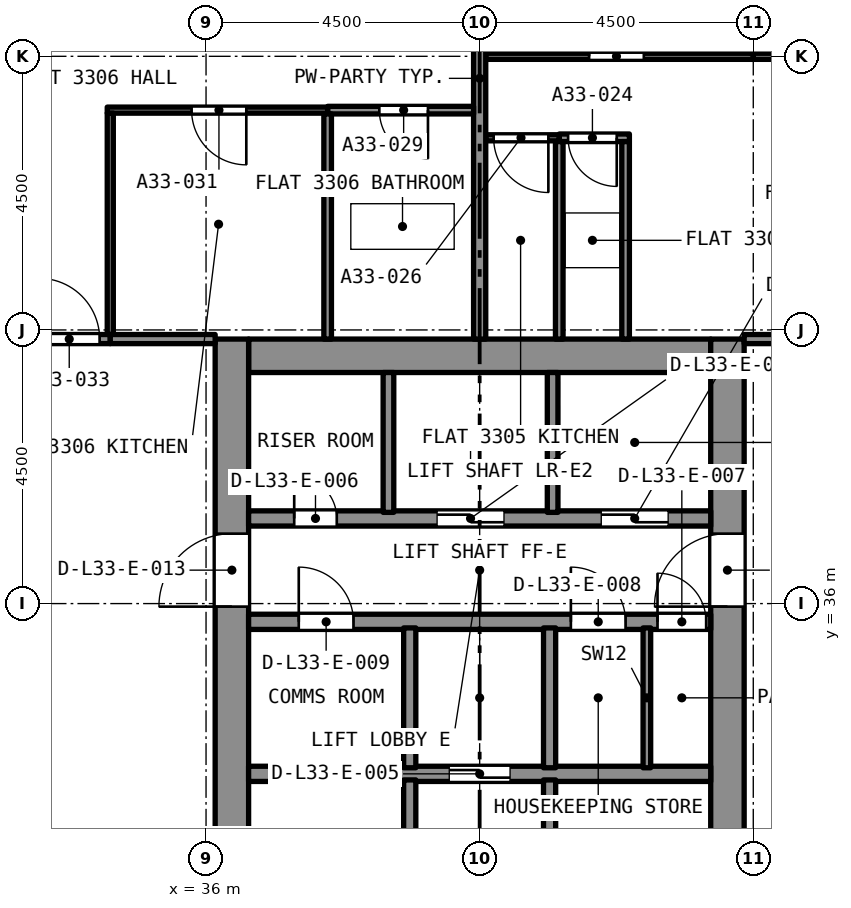
"""IFC4 building model, lengths in metres.
Left out: names, types, materials, properties, quantities, classifications, styles, units other than length and angle.
Written with IfcOpenShell. Run it as: python <this file> out.ifc"""

import sys

from ifc_helpers import new_model, si_unit, direction, frame, frame_2d, origin, place, context, subcontext, project, spatial, rectangle, extrude, element, fill, save


model = new_model("IFC4")
c1 = context("Model", 3, precision=1e-05, world=origin(), true_north=direction((0.0, 1.0)))
c2 = subcontext(c1, "Body", "Model", "MODEL_VIEW")
j1 = project(units=[si_unit("LENGTHUNIT", "METRE"), si_unit("PLANEANGLEUNIT", "RADIAN")], contexts=[c1])
p1 = place(None, origin())
s1 = spatial("IfcSite", under=j1, at=p1, CompositionType="ELEMENT")
p2 = place(p1, origin())
s2 = spatial("IfcBuilding", under=s1, at=p2, CompositionType="ELEMENT")
p3 = place(p2, frame((0.0, 0.0, 118.4)))
s3 = spatial("IfcBuildingStorey", under=s2, at=p3, CompositionType="ELEMENT", Elevation=118.4)
p4 = place(p3, frame((36.7, 40.075, 0.0), z_axis=(0.0, 0.0, 1.0), x_axis=(1.0, 0.0, 0.0)))
e1 = element("IfcWall", 1, at=p4, inside=s3, PredefinedType="SOLIDWALL", context=c2, shape_type="SweptSolid", body=[
    extrude(rectangle(XDim=7.6, YDim=0.55, at=frame_2d((3.8, 0.0))), origin(), (0.0, 0.0, 1.0), 3.2),
])
p5 = place(p3, frame((36.425, 27.15, 0.0), z_axis=(0.0, 0.0, 1.0), x_axis=(0.0, 1.0, 0.0)))
e2 = element("IfcWall", 2, at=p5, inside=s3, PredefinedType="SOLIDWALL", context=c2, shape_type="SweptSolid", body=[
    extrude(rectangle(XDim=13.2, YDim=0.55, at=frame_2d((6.6, 0.0))), origin(), (0.0, 0.0, 1.0), 3.2),
])
p6 = place(p5, frame((8.8, 0.0, 0.0)))
e3 = element("IfcOpeningElement", 3, at=p6, cuts=e2, PredefinedType="OPENING", context=c2, shape_type="SweptSolid", body=[
    extrude(rectangle(XDim=1.2, YDim=2.1, at=frame_2d((0.6, 1.05))), frame((0.0, 0.285, 0.0), z_axis=(0.0, -1.0, 0.0), x_axis=(1.0, 0.0, 0.0)), (0.0, 0.0, 1.0), 0.57),
])
p7 = place(p3, frame((44.575, 27.15, 0.0), z_axis=(0.0, 0.0, 1.0), x_axis=(0.0, 1.0, 0.0)))
e4 = element("IfcWall", 4, at=p7, inside=s3, PredefinedType="SOLIDWALL", context=c2, shape_type="SweptSolid", body=[
    extrude(rectangle(XDim=13.2, YDim=0.55, at=frame_2d((6.6, 0.0))), origin(), (0.0, 0.0, 1.0), 3.2),
])
p8 = place(p7, frame((8.8, 0.0, 0.0)))
e5 = element("IfcOpeningElement", 5, at=p8, cuts=e4, PredefinedType="OPENING", context=c2, shape_type="SweptSolid", body=[
    extrude(rectangle(XDim=1.2, YDim=2.1, at=frame_2d((0.6, 1.05))), frame((0.0, 0.285, 0.0), z_axis=(0.0, -1.0, 0.0), x_axis=(1.0, 0.0, 0.0)), (0.0, 0.0, 1.0), 0.57),
])
p9 = place(p3, frame((42.962, 43.66, 0.0), z_axis=(0.0, 0.0, 1.0), x_axis=(-1.0, 0.0, 0.0)))
e6 = element("IfcWall", 6, at=p9, inside=s3, PredefinedType="PARTITIONING", context=c2, shape_type="SweptSolid", body=[
    extrude(rectangle(XDim=1.153, YDim=0.125, at=frame_2d((0.577, 0.0))), origin(), (0.0, 0.0, 1.0), 2.9),
])
p10 = place(p9, frame((0.208, 0.0, 0.0)))
e7 = element("IfcOpeningElement", 7, at=p10, cuts=e6, PredefinedType="OPENING", context=c2, shape_type="SweptSolid", body=[
    extrude(rectangle(XDim=0.8, YDim=2.1, at=frame_2d((0.4, 1.05))), frame((0.0, 0.073, 0.0), z_axis=(0.0, -1.0, 0.0), x_axis=(1.0, 0.0, 0.0)), (0.0, 0.0, 1.0), 0.145),
])
for number, where, z_axis, x_axis in (
    (8, (42.9, 40.35, 0.0), (0.0, 0.0, 1.0), (0.0, 1.0, 0.0)),
    (9, (41.809, 40.35, 0.0), (0.0, 0.0, 1.0), (0.0, 1.0, 0.0)),
):
    element("IfcWall", number, at=place(p3, frame(where, z_axis=z_axis, x_axis=x_axis)), inside=s3, PredefinedType="PARTITIONING", context=c2, shape_type="SweptSolid", body=[
        extrude(rectangle(XDim=3.247, YDim=0.125, at=frame_2d((1.624, 0.0))), origin(), (0.0, 0.0, 1.0), 2.9),
    ])
p11 = place(p3, frame((40.6, 45.0, 0.0), z_axis=(0.0, 0.0, 1.0), x_axis=(1.0, 0.0, 0.0)))
e10 = element("IfcWall", 10, at=p11, inside=s3, PredefinedType="PARTITIONING", context=c2, shape_type="SweptSolid", body=[
    extrude(rectangle(XDim=4.4, YDim=0.1, at=frame_2d((2.2, 0.0))), origin(), (0.0, 0.0, 1.0), 2.9),
])
p12 = place(p11, frame((1.7, 0.0, 0.0)))
e11 = element("IfcOpeningElement", 11, at=p12, cuts=e10, PredefinedType="OPENING", context=c2, shape_type="SweptSolid", body=[
    extrude(rectangle(XDim=0.9, YDim=2.1, at=frame_2d((0.45, 1.05))), frame((0.0, 0.06, 0.0), z_axis=(0.0, -1.0, 0.0), x_axis=(1.0, 0.0, 0.0)), (0.0, 0.0, 1.0), 0.12),
])
p13 = place(p3, frame((45.0, 45.05, 0.0), z_axis=(0.0, 0.0, 1.0), x_axis=(0.0, 1.0, 0.0)))
e12 = element("IfcWall", 12, at=p13, inside=s3, PredefinedType="PARTITIONING", context=c2, shape_type="SweptSolid", body=[
    extrude(rectangle(XDim=3.828, YDim=0.1, at=frame_2d((1.914, 0.0))), origin(), (0.0, 0.0, 1.0), 2.9),
])
p14 = place(p3, frame((41.809, 43.66, 0.0), z_axis=(0.0, 0.0, 1.0), x_axis=(-1.0, 0.0, 0.0)))
e13 = element("IfcWall", 13, at=p14, inside=s3, PredefinedType="PARTITIONING", context=c2, shape_type="SweptSolid", body=[
    extrude(rectangle(XDim=1.209, YDim=0.1, at=frame_2d((0.604, 0.0))), origin(), (0.0, 0.0, 1.0), 2.9),
])
p15 = place(p14, frame((0.179, 0.0, 0.0)))
e14 = element("IfcOpeningElement", 14, at=p15, cuts=e13, PredefinedType="OPENING", context=c2, shape_type="SweptSolid", body=[
    extrude(rectangle(XDim=0.9, YDim=2.1, at=frame_2d((0.45, 1.05))), frame((0.0, 0.06, 0.0), z_axis=(0.0, -1.0, 0.0), x_axis=(1.0, 0.0, 0.0)), (0.0, 0.0, 1.0), 0.12),
])
p16 = place(p3, frame((45.0, 45.0, 0.0), z_axis=(0.0, 0.0, 1.0), x_axis=(1.0, 0.0, 0.0)))
e15 = element("IfcWall", 15, at=p16, inside=s3, PredefinedType="PARTITIONING", context=c2, shape_type="SweptSolid", body=[
    extrude(rectangle(XDim=3.878, YDim=0.1, at=frame_2d((1.939, 0.0))), origin(), (0.0, 0.0, 1.0), 2.9),
])
p17 = place(p16, frame((1.462, 0.0, 0.0)))
e16 = element("IfcOpeningElement", 16, at=p17, cuts=e15, PredefinedType="OPENING", context=c2, shape_type="SweptSolid", body=[
    extrude(rectangle(XDim=1.0, YDim=2.1, at=frame_2d((0.5, 1.05))), frame((0.0, 0.06, 0.0), z_axis=(0.0, -1.0, 0.0), x_axis=(1.0, 0.0, 0.0)), (0.0, 0.0, 1.0), 0.12),
])
p18 = place(p3, frame((44.85, 40.35, 0.0), z_axis=(0.0, 0.0, 1.0), x_axis=(1.0, 0.0, 0.0)))
e17 = element("IfcWall", 17, at=p18, inside=s3, PredefinedType="PARTITIONING", context=c2, shape_type="SweptSolid", body=[
    extrude(rectangle(XDim=4.075, YDim=0.15, at=frame_2d((2.038, 0.0))), origin(), (0.0, 0.0, 1.0), 2.9),
])
p19 = place(p18, frame((1.9, 0.0, 0.0)))
e18 = element("IfcOpeningElement", 18, at=p19, cuts=e17, PredefinedType="OPENING", context=c2, shape_type="SweptSolid", body=[
    extrude(rectangle(XDim=1.0, YDim=2.1, at=frame_2d((0.5, 1.05))), frame((0.0, 0.085, 0.0), z_axis=(0.0, -1.0, 0.0), x_axis=(1.0, 0.0, 0.0)), (0.0, 0.0, 1.0), 0.17),
])
p20 = place(p3, frame((40.5, 40.35, 0.0), z_axis=(0.0, 0.0, 1.0), x_axis=(0.0, 1.0, 0.0)))
e19 = element("IfcWall", 19, at=p20, inside=s3, PredefinedType="PARTITIONING", context=c2, shape_type="SweptSolid", body=[
    extrude(rectangle(XDim=8.575, YDim=0.2, at=frame_2d((4.288, 0.0))), origin(), (0.0, 0.0, 1.0), 2.9),
])
p21 = place(p3, frame((40.4, 44.115, 0.0), z_axis=(0.0, 0.0, 1.0), x_axis=(-1.0, 0.0, 0.0)))
e20 = element("IfcWall", 20, at=p21, inside=s3, PredefinedType="PARTITIONING", context=c2, shape_type="SweptSolid", body=[
    extrude(rectangle(XDim=2.4, YDim=0.125, at=frame_2d((1.2, 0.0))), origin(), (0.0, 0.0, 1.0), 2.9),
])
p22 = place(p21, frame((0.75, 0.0, 0.0)))
e21 = element("IfcOpeningElement", 21, at=p22, cuts=e20, PredefinedType="OPENING", context=c2, shape_type="SweptSolid", body=[
    extrude(rectangle(XDim=0.8, YDim=2.1, at=frame_2d((0.4, 1.05))), frame((0.0, 0.073, 0.0), z_axis=(0.0, -1.0, 0.0), x_axis=(1.0, 0.0, 0.0)), (0.0, 0.0, 1.0), 0.145),
])
p23 = place(p3, frame((38.0, 40.35, 0.0), z_axis=(0.0, 0.0, 1.0), x_axis=(0.0, 1.0, 0.0)))
e22 = element("IfcWall", 22, at=p23, inside=s3, PredefinedType="PARTITIONING", context=c2, shape_type="SweptSolid", body=[
    extrude(rectangle(XDim=3.702, YDim=0.125, at=frame_2d((1.851, 0.0))), origin(), (0.0, 0.0, 1.0), 2.9),
])
p24 = place(p3, frame((38.0, 44.115, 0.0), z_axis=(0.0, 0.0, 1.0), x_axis=(-1.0, 0.0, 0.0)))
e23 = element("IfcWall", 23, at=p24, inside=s3, PredefinedType="PARTITIONING", context=c2, shape_type="SweptSolid", body=[
    extrude(rectangle(XDim=3.625, YDim=0.1, at=frame_2d((1.812, 0.0))), origin(), (0.0, 0.0, 1.0), 2.9),
])
p25 = place(p24, frame((1.337, 0.0, 0.0)))
e24 = element("IfcOpeningElement", 24, at=p25, cuts=e23, PredefinedType="OPENING", context=c2, shape_type="SweptSolid", body=[
    extrude(rectangle(XDim=0.9, YDim=2.1, at=frame_2d((0.45, 1.05))), frame((0.0, 0.06, 0.0), z_axis=(0.0, -1.0, 0.0), x_axis=(1.0, 0.0, 0.0)), (0.0, 0.0, 1.0), 0.12),
])
p26 = place(p3, frame((34.425, 40.425, 0.0), z_axis=(0.0, 0.0, 1.0), x_axis=(0.0, 1.0, 0.0)))
e25 = element("IfcWall", 25, at=p26, inside=s3, PredefinedType="PARTITIONING", context=c2, shape_type="SweptSolid", body=[
    extrude(rectangle(XDim=3.64, YDim=0.1, at=frame_2d((1.82, 0.0))), origin(), (0.0, 0.0, 1.0), 2.9),
])
p27 = place(p3, frame((32.075, 40.35, 0.0), z_axis=(0.0, 0.0, 1.0), x_axis=(1.0, 0.0, 0.0)))
e26 = element("IfcWall", 26, at=p27, inside=s3, PredefinedType="PARTITIONING", context=c2, shape_type="SweptSolid", body=[
    extrude(rectangle(XDim=2.35, YDim=0.15, at=frame_2d((1.175, 0.0))), origin(), (0.0, 0.0, 1.0), 2.9),
])
p28 = place(p27, frame((1.175, 0.0, 0.0)))
e27 = element("IfcOpeningElement", 27, at=p28, cuts=e26, PredefinedType="OPENING", context=c2, shape_type="SweptSolid", body=[
    extrude(rectangle(XDim=1.0, YDim=2.1, at=frame_2d((0.5, 1.05))), frame((0.0, 0.085, 0.0), z_axis=(0.0, -1.0, 0.0), x_axis=(1.0, 0.0, 0.0)), (0.0, 0.0, 1.0), 0.17),
])
p29 = place(p3, frame((34.425, 40.35, 0.0), z_axis=(0.0, 0.0, 1.0), x_axis=(1.0, 0.0, 0.0)))
e28 = element("IfcWall", 28, at=p29, inside=s3, PredefinedType="PARTITIONING", context=c2, shape_type="SweptSolid", body=[
    extrude(rectangle(XDim=1.725, YDim=0.15, at=frame_2d((0.862, 0.0))), origin(), (0.0, 0.0, 1.0), 2.9),
])
p30 = place(p3, frame((36.7, 33.2, 0.0), z_axis=(0.0, 0.0, 1.0), x_axis=(1.0, 0.0, 0.0)))
e29 = element("IfcWall", 29, at=p30, inside=s3, PredefinedType="SOLIDWALL", context=c2, shape_type="SweptSolid", body=[
    extrude(rectangle(XDim=7.6, YDim=0.25, at=frame_2d((3.8, 0.0))), origin(), (0.0, 0.0, 1.0), 2.9),
])
p31 = place(p30, frame((3.3, 0.0, 0.0)))
e30 = element("IfcOpeningElement", 30, at=p31, cuts=e29, PredefinedType="OPENING", context=c2, shape_type="SweptSolid", body=[
    extrude(rectangle(XDim=1.0, YDim=2.1, at=frame_2d((0.5, 1.05))), frame((0.0, 0.135, 0.0), z_axis=(0.0, -1.0, 0.0), x_axis=(1.0, 0.0, 0.0)), (0.0, 0.0, 1.0), 0.27),
])
p32 = place(p3, frame((36.7, 35.7, 0.0), z_axis=(0.0, 0.0, 1.0), x_axis=(1.0, 0.0, 0.0)))
e31 = element("IfcWall", 31, at=p32, inside=s3, PredefinedType="SOLIDWALL", context=c2, shape_type="SweptSolid", body=[
    extrude(rectangle(XDim=7.6, YDim=0.25, at=frame_2d((3.8, 0.0))), origin(), (0.0, 0.0, 1.0), 2.9),
])
p33 = place(p32, frame((6.725, 0.0, 0.0)))
e32 = element("IfcOpeningElement", 32, at=p33, cuts=e31, PredefinedType="OPENING", context=c2, shape_type="SweptSolid", body=[
    extrude(rectangle(XDim=0.8, YDim=2.1, at=frame_2d((0.4, 1.05))), frame((0.0, 0.135, 0.0), z_axis=(0.0, -1.0, 0.0), x_axis=(1.0, 0.0, 0.0)), (0.0, 0.0, 1.0), 0.27),
])
p34 = place(p32, frame((5.3, 0.0, 0.0)))
e33 = element("IfcOpeningElement", 33, at=p34, cuts=e31, PredefinedType="OPENING", context=c2, shape_type="SweptSolid", body=[
    extrude(rectangle(XDim=0.9, YDim=2.1, at=frame_2d((0.45, 1.05))), frame((0.0, 0.135, 0.0), z_axis=(0.0, -1.0, 0.0), x_axis=(1.0, 0.0, 0.0)), (0.0, 0.0, 1.0), 0.27),
])
p35 = place(p32, frame((0.825, 0.0, 0.0)))
e34 = element("IfcOpeningElement", 34, at=p35, cuts=e31, PredefinedType="OPENING", context=c2, shape_type="SweptSolid", body=[
    extrude(rectangle(XDim=0.9, YDim=2.1, at=frame_2d((0.45, 1.05))), frame((0.0, 0.135, 0.0), z_axis=(0.0, -1.0, 0.0), x_axis=(1.0, 0.0, 0.0)), (0.0, 0.0, 1.0), 0.27),
])
p36 = place(p3, frame((36.7, 37.4, 0.0), z_axis=(0.0, 0.0, 1.0), x_axis=(1.0, 0.0, 0.0)))
e35 = element("IfcWall", 35, at=p36, inside=s3, PredefinedType="SOLIDWALL", context=c2, shape_type="SweptSolid", body=[
    extrude(rectangle(XDim=7.6, YDim=0.25, at=frame_2d((3.8, 0.0))), origin(), (0.0, 0.0, 1.0), 2.9),
])
p37 = place(p36, frame((5.8, 0.0, 0.0)))
e36 = element("IfcOpeningElement", 36, at=p37, cuts=e35, PredefinedType="OPENING", context=c2, shape_type="SweptSolid", body=[
    extrude(rectangle(XDim=1.1, YDim=2.4, at=frame_2d((0.55, 1.2))), frame((0.0, 0.135, 0.0), z_axis=(0.0, -1.0, 0.0), x_axis=(1.0, 0.0, 0.0)), (0.0, 0.0, 1.0), 0.27),
])
p38 = place(p36, frame((3.1, 0.0, 0.0)))
e37 = element("IfcOpeningElement", 37, at=p38, cuts=e35, PredefinedType="OPENING", context=c2, shape_type="SweptSolid", body=[
    extrude(rectangle(XDim=1.1, YDim=2.4, at=frame_2d((0.55, 1.2))), frame((0.0, 0.135, 0.0), z_axis=(0.0, -1.0, 0.0), x_axis=(1.0, 0.0, 0.0)), (0.0, 0.0, 1.0), 0.27),
])
p39 = place(p36, frame((0.75, 0.0, 0.0)))
e38 = element("IfcOpeningElement", 38, at=p39, cuts=e35, PredefinedType="OPENING", context=c2, shape_type="SweptSolid", body=[
    extrude(rectangle(XDim=0.7, YDim=2.1, at=frame_2d((0.35, 1.05))), frame((0.0, 0.135, 0.0), z_axis=(0.0, -1.0, 0.0), x_axis=(1.0, 0.0, 0.0)), (0.0, 0.0, 1.0), 0.27),
])
p40 = place(p3, frame((41.65, 27.7, 0.0), z_axis=(0.0, 0.0, 1.0), x_axis=(0.0, 1.0, 0.0)))
e39 = element("IfcWall", 39, at=p40, inside=s3, PredefinedType="SOLIDWALL", context=c2, shape_type="SweptSolid", body=[
    extrude(rectangle(XDim=5.4, YDim=0.2, at=frame_2d((2.7, 0.0))), origin(), (0.0, 0.0, 1.0), 2.9),
])
p41 = place(p40, frame((0.2, 0.0, 0.0)))
e40 = element("IfcOpeningElement", 40, at=p41, cuts=e39, PredefinedType="OPENING", context=c2, shape_type="SweptSolid", body=[
    extrude(rectangle(XDim=0.9, YDim=2.1, at=frame_2d((0.45, 1.05))), frame((0.0, 0.11, 0.0), z_axis=(0.0, -1.0, 0.0), x_axis=(1.0, 0.0, 0.0)), (0.0, 0.0, 1.0), 0.22),
])
p42 = place(p3, frame((39.35, 27.7, 0.0), z_axis=(0.0, 0.0, 1.0), x_axis=(0.0, 1.0, 0.0)))
e41 = element("IfcWall", 41, at=p42, inside=s3, PredefinedType="SOLIDWALL", context=c2, shape_type="SweptSolid", body=[
    extrude(rectangle(XDim=5.4, YDim=0.2, at=frame_2d((2.7, 0.0))), origin(), (0.0, 0.0, 1.0), 2.9),
])
p43 = place(p42, frame((0.2, 0.0, 0.0)))
e42 = element("IfcOpeningElement", 42, at=p43, cuts=e41, PredefinedType="OPENING", context=c2, shape_type="SweptSolid", body=[
    extrude(rectangle(XDim=0.9, YDim=2.1, at=frame_2d((0.45, 1.05))), frame((0.0, 0.11, 0.0), z_axis=(0.0, -1.0, 0.0), x_axis=(1.0, 0.0, 0.0)), (0.0, 0.0, 1.0), 0.22),
])
for number, where, z_axis, x_axis in (
    (43, (41.65, 33.3, 0.0), (0.0, 0.0, 1.0), (0.0, 1.0, 0.0)),
    (44, (39.35, 33.3, 0.0), (0.0, 0.0, 1.0), (0.0, 1.0, 0.0)),
):
    element("IfcWall", number, at=place(p3, frame(where, z_axis=z_axis, x_axis=x_axis)), inside=s3, PredefinedType="SOLIDWALL", context=c2, shape_type="SweptSolid", body=[
        extrude(rectangle(XDim=2.3, YDim=0.2, at=frame_2d((1.15, 0.0))), origin(), (0.0, 0.0, 1.0), 2.9),
    ])
for number, where, z_axis, x_axis in (
    (45, (41.7, 37.5, 0.0), (0.0, 0.0, 1.0), (0.0, 1.0, 0.0)),
    (46, (39.0, 37.5, 0.0), (0.0, 0.0, 1.0), (0.0, 1.0, 0.0)),
):
    element("IfcWall", number, at=place(p3, frame(where, z_axis=z_axis, x_axis=x_axis)), inside=s3, PredefinedType="SOLIDWALL", context=c2, shape_type="SweptSolid", body=[
        extrude(rectangle(XDim=2.3, YDim=0.175, at=frame_2d((1.15, 0.0))), origin(), (0.0, 0.0, 1.0), 2.9),
    ])
p44 = place(p3, frame((43.25, 33.3, 0.0), z_axis=(0.0, 0.0, 1.0), x_axis=(0.0, 1.0, 0.0)))
e47 = element("IfcWall", 47, at=p44, inside=s3, PredefinedType="PARTITIONING", context=c2, shape_type="SweptSolid", body=[
    extrude(rectangle(XDim=2.3, YDim=0.125, at=frame_2d((1.15, 0.0))), origin(), (0.0, 0.0, 1.0), 2.9),
])
p45 = place(p10, origin())
e48 = element("IfcDoor", 48, at=p45, inside=s3, OperationType="SINGLE_SWING_RIGHT", PredefinedType="DOOR", context=c2, shape_type="SweptSolid", body=[
    extrude(rectangle(XDim=0.8, YDim=2.1, at=frame_2d((0.4, 1.05))), frame((0.0, 0.025, 0.0), z_axis=(0.0, -1.0, 0.0), x_axis=(1.0, 0.0, 0.0)), (0.0, 0.0, 1.0), 0.05),
])
fill(e7, e48)
p46 = place(p12, origin())
e49 = element("IfcDoor", 49, at=p46, inside=s3, OperationType="SINGLE_SWING_LEFT", PredefinedType="DOOR", context=c2, shape_type="SweptSolid", body=[
    extrude(rectangle(XDim=0.9, YDim=2.1, at=frame_2d((0.45, 1.05))), frame((0.0, 0.025, 0.0), z_axis=(0.0, -1.0, 0.0), x_axis=(1.0, 0.0, 0.0)), (0.0, 0.0, 1.0), 0.05),
])
fill(e11, e49)
p47 = place(p15, origin())
e50 = element("IfcDoor", 50, at=p47, inside=s3, OperationType="SINGLE_SWING_RIGHT", PredefinedType="DOOR", context=c2, shape_type="SweptSolid", body=[
    extrude(rectangle(XDim=0.9, YDim=2.1, at=frame_2d((0.45, 1.05))), frame((0.0, 0.025, 0.0), z_axis=(0.0, -1.0, 0.0), x_axis=(1.0, 0.0, 0.0)), (0.0, 0.0, 1.0), 0.05),
])
fill(e14, e50)
p48 = place(p22, origin())
e51 = element("IfcDoor", 51, at=p48, inside=s3, OperationType="SINGLE_SWING_LEFT", PredefinedType="DOOR", context=c2, shape_type="SweptSolid", body=[
    extrude(rectangle(XDim=0.8, YDim=2.1, at=frame_2d((0.4, 1.05))), frame((0.0, 0.025, 0.0), z_axis=(0.0, -1.0, 0.0), x_axis=(1.0, 0.0, 0.0)), (0.0, 0.0, 1.0), 0.05),
])
fill(e21, e51)
p49 = place(p25, origin())
e52 = element("IfcDoor", 52, at=p49, inside=s3, OperationType="SINGLE_SWING_LEFT", PredefinedType="DOOR", context=c2, shape_type="SweptSolid", body=[
    extrude(rectangle(XDim=0.9, YDim=2.1, at=frame_2d((0.45, 1.05))), frame((0.0, 0.025, 0.0), z_axis=(0.0, -1.0, 0.0), x_axis=(1.0, 0.0, 0.0)), (0.0, 0.0, 1.0), 0.05),
])
fill(e24, e52)
p50 = place(p28, origin())
e53 = element("IfcDoor", 53, at=p50, inside=s3, OperationType="SINGLE_SWING_RIGHT", PredefinedType="DOOR", context=c2, shape_type="SweptSolid", body=[
    extrude(rectangle(XDim=1.0, YDim=2.1, at=frame_2d((0.5, 1.05))), frame((0.0, 0.025, 0.0), z_axis=(0.0, -1.0, 0.0), x_axis=(1.0, 0.0, 0.0)), (0.0, 0.0, 1.0), 0.05),
])
fill(e27, e53)
p51 = place(p37, origin())
e54 = element("IfcDoor", 54, at=p51, inside=s3, OperationType="SLIDING_TO_LEFT", PredefinedType="DOOR", context=c2, shape_type="SweptSolid", body=[
    extrude(rectangle(XDim=1.1, YDim=2.4, at=frame_2d((0.55, 1.2))), frame((0.0, 0.025, 0.0), z_axis=(0.0, -1.0, 0.0), x_axis=(1.0, 0.0, 0.0)), (0.0, 0.0, 1.0), 0.05),
])
fill(e36, e54)
p52 = place(p38, origin())
e55 = element("IfcDoor", 55, at=p52, inside=s3, OperationType="SLIDING_TO_LEFT", PredefinedType="DOOR", context=c2, shape_type="SweptSolid", body=[
    extrude(rectangle(XDim=1.1, YDim=2.4, at=frame_2d((0.55, 1.2))), frame((0.0, 0.025, 0.0), z_axis=(0.0, -1.0, 0.0), x_axis=(1.0, 0.0, 0.0)), (0.0, 0.0, 1.0), 0.05),
])
fill(e37, e55)
p53 = place(p31, origin())
e56 = element("IfcDoor", 56, at=p53, inside=s3, OperationType="SLIDING_TO_LEFT", PredefinedType="DOOR", context=c2, shape_type="SweptSolid", body=[
    extrude(rectangle(XDim=1.0, YDim=2.1, at=frame_2d((0.5, 1.05))), frame((0.0, 0.025, 0.0), z_axis=(0.0, -1.0, 0.0), x_axis=(1.0, 0.0, 0.0)), (0.0, 0.0, 1.0), 0.05),
])
fill(e30, e56)
p54 = place(p39, origin())
e57 = element("IfcDoor", 57, at=p54, inside=s3, OperationType="SINGLE_SWING_LEFT", PredefinedType="DOOR", context=c2, shape_type="SweptSolid", body=[
    extrude(rectangle(XDim=0.7, YDim=2.1, at=frame_2d((0.35, 1.05))), frame((0.0, 0.025, 0.0), z_axis=(0.0, -1.0, 0.0), x_axis=(1.0, 0.0, 0.0)), (0.0, 0.0, 1.0), 0.05),
])
fill(e38, e57)
p55 = place(p33, origin())
e58 = element("IfcDoor", 58, at=p55, inside=s3, OperationType="SINGLE_SWING_LEFT", PredefinedType="DOOR", context=c2, shape_type="SweptSolid", body=[
    extrude(rectangle(XDim=0.8, YDim=2.1, at=frame_2d((0.4, 1.05))), frame((0.0, 0.025, 0.0), z_axis=(0.0, -1.0, 0.0), x_axis=(1.0, 0.0, 0.0)), (0.0, 0.0, 1.0), 0.05),
])
fill(e32, e58)
p56 = place(p34, origin())
e59 = element("IfcDoor", 59, at=p56, inside=s3, OperationType="SINGLE_SWING_LEFT", PredefinedType="DOOR", context=c2, shape_type="SweptSolid", body=[
    extrude(rectangle(XDim=0.9, YDim=2.1, at=frame_2d((0.45, 1.05))), frame((0.0, 0.025, 0.0), z_axis=(0.0, -1.0, 0.0), x_axis=(1.0, 0.0, 0.0)), (0.0, 0.0, 1.0), 0.05),
])
fill(e33, e59)
p57 = place(p35, origin())
e60 = element("IfcDoor", 60, at=p57, inside=s3, OperationType="SINGLE_SWING_LEFT", PredefinedType="DOOR", context=c2, shape_type="SweptSolid", body=[
    extrude(rectangle(XDim=0.9, YDim=2.1, at=frame_2d((0.45, 1.05))), frame((0.0, 0.025, 0.0), z_axis=(0.0, -1.0, 0.0), x_axis=(1.0, 0.0, 0.0)), (0.0, 0.0, 1.0), 0.05),
])
fill(e34, e60)
p58 = place(p6, origin())
e61 = element("IfcDoor", 61, at=p58, inside=s3, OperationType="SINGLE_SWING_LEFT", PredefinedType="DOOR", context=c2, shape_type="SweptSolid", body=[
    extrude(rectangle(XDim=1.2, YDim=2.1, at=frame_2d((0.6, 1.05))), frame((0.0, 0.025, 0.0), z_axis=(0.0, -1.0, 0.0), x_axis=(1.0, 0.0, 0.0)), (0.0, 0.0, 1.0), 0.05),
])
fill(e3, e61)
p59 = place(p8, origin())
e62 = element("IfcDoor", 62, at=p59, inside=s3, OperationType="SINGLE_SWING_LEFT", PredefinedType="DOOR", context=c2, shape_type="SweptSolid", body=[
    extrude(rectangle(XDim=1.2, YDim=2.1, at=frame_2d((0.6, 1.05))), frame((0.0, 0.025, 0.0), z_axis=(0.0, -1.0, 0.0), x_axis=(1.0, 0.0, 0.0)), (0.0, 0.0, 1.0), 0.05),
])
fill(e5, e62)
save(model, sys.argv[1])
